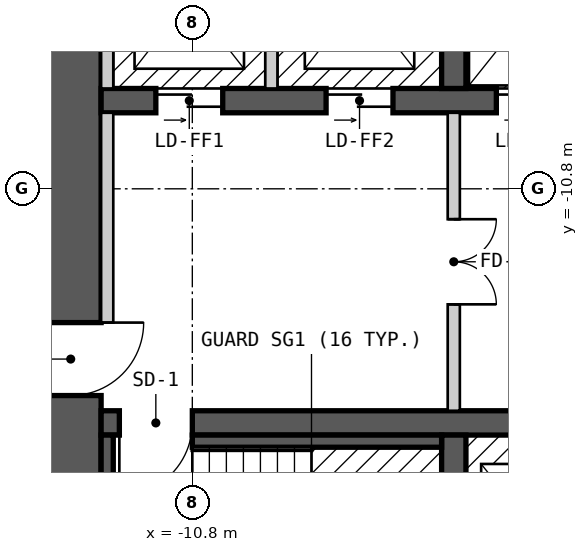
"""IFC4 building model, lengths in metres.
Left out: names, types, materials, properties, quantities, classifications, styles, units other than length and angle.
Written with IfcOpenShell. Run it as: python <this file> out.ifc"""

import sys

from ifc_helpers import new_model, si_unit, direction, frame, frame_2d, origin, place, context, subcontext, project, spatial, rectangle, extrude, element, fill, save


model = new_model("IFC4")
c1 = context("Model", 3, precision=1e-05, world=origin(), true_north=direction((0.0, 1.0)))
c2 = subcontext(c1, "Body", "Model", "MODEL_VIEW")
j1 = project(units=[si_unit("LENGTHUNIT", "METRE"), si_unit("PLANEANGLEUNIT", "RADIAN")], contexts=[c1])
p1 = place(None, origin())
s1 = spatial("IfcSite", under=j1, at=p1, CompositionType="ELEMENT")
p2 = place(p1, origin())
s2 = spatial("IfcBuilding", under=s1, at=p2, CompositionType="ELEMENT")
p3 = place(p2, frame((0.0, 0.0, 81.0)))
s3 = spatial("IfcBuildingStorey", under=s2, at=p3, CompositionType="ELEMENT", Elevation=81.0)
p4 = place(p3, frame((-12.8, -18.0, 0.0), z_axis=(0.0, 0.0, 1.0), x_axis=(0.0, 1.0, 0.0)))
e1 = element("IfcWall", 1, at=p4, inside=s3, PredefinedType="SHEAR", context=c2, shape_type="SweptSolid", body=[
    extrude(rectangle(XDim=12.0, YDim=1.0, at=frame_2d((6.0, 0.0))), origin(), (0.0, 0.0, 1.0), 2.7),
])
p5 = place(p4, frame((3.8, 0.0, 0.0)))
e2 = element("IfcOpeningElement", 2, at=p5, cuts=e1, PredefinedType="OPENING", context=c2, shape_type="SweptSolid", body=[
    extrude(rectangle(XDim=1.2, YDim=2.1, at=frame_2d((0.6, 1.05))), frame((0.0, 0.51, 0.0), z_axis=(0.0, -1.0, 0.0), x_axis=(1.0, 0.0, 0.0)), (0.0, 0.0, 1.0), 1.02),
])
p6 = place(p3, frame((-12.3, -14.65, 0.0), z_axis=(0.0, 0.0, 1.0), x_axis=(1.0, 0.0, 0.0)))
e3 = element("IfcWall", 3, at=p6, inside=s3, PredefinedType="SHEAR", context=c2, shape_type="SweptSolid", body=[
    extrude(rectangle(XDim=24.6, YDim=0.4, at=frame_2d((12.3, 0.0))), origin(), (0.0, 0.0, 1.0), 2.7),
])
p7 = place(p6, frame((1.5, 0.0, 0.0), z_axis=(0.0, 0.0, 1.0), x_axis=(-1.0, 0.0, 0.0)))
e4 = element("IfcOpeningElement", 4, at=p7, cuts=e3, PredefinedType="OPENING", context=c2, shape_type="SweptSolid", body=[
    extrude(rectangle(XDim=1.2, YDim=2.1, at=frame_2d((0.6, 1.05))), frame((0.0, 0.21, 0.0), z_axis=(0.0, -1.0, 0.0), x_axis=(1.0, 0.0, 0.0)), (0.0, 0.0, 1.0), 0.42),
])
p8 = place(p6, frame((24.35, 0.0, 0.0), z_axis=(0.0, 0.0, 1.0), x_axis=(-1.0, 0.0, 0.0)))
e5 = element("IfcOpeningElement", 5, at=p8, cuts=e3, PredefinedType="OPENING", context=c2, shape_type="SweptSolid", body=[
    extrude(rectangle(XDim=1.2, YDim=2.1, at=frame_2d((0.6, 1.05))), frame((0.0, 0.21, 0.0), z_axis=(0.0, -1.0, 0.0), x_axis=(1.0, 0.0, 0.0)), (0.0, 0.0, 1.0), 0.42),
])
p9 = place(p6, frame((16.45, 0.0, 0.0), z_axis=(0.0, 0.0, 1.0), x_axis=(-1.0, 0.0, 0.0)))
e6 = element("IfcOpeningElement", 6, at=p9, cuts=e3, PredefinedType="OPENING", context=c2, shape_type="SweptSolid", body=[
    extrude(rectangle(XDim=0.9, YDim=2.1, at=frame_2d((0.45, 1.05))), frame((0.0, 0.21, 0.0), z_axis=(0.0, -1.0, 0.0), x_axis=(1.0, 0.0, 0.0)), (0.0, 0.0, 1.0), 0.42),
])
p10 = place(p6, frame((18.25, 0.0, 0.0), z_axis=(0.0, 0.0, 1.0), x_axis=(-1.0, 0.0, 0.0)))
e7 = element("IfcOpeningElement", 7, at=p10, cuts=e3, PredefinedType="OPENING", context=c2, shape_type="SweptSolid", body=[
    extrude(rectangle(XDim=0.9, YDim=2.1, at=frame_2d((0.45, 1.05))), frame((0.0, 0.21, 0.0), z_axis=(0.0, -1.0, 0.0), x_axis=(1.0, 0.0, 0.0)), (0.0, 0.0, 1.0), 0.42),
])
p11 = place(p3, frame((-12.3, -9.35, 0.0), z_axis=(0.0, 0.0, 1.0), x_axis=(1.0, 0.0, 0.0)))
e8 = element("IfcWall", 8, at=p11, inside=s3, PredefinedType="SHEAR", context=c2, shape_type="SweptSolid", body=[
    extrude(rectangle(XDim=22.5, YDim=0.4, at=frame_2d((11.25, 0.0))), origin(), (0.0, 0.0, 1.0), 2.7),
])
p12 = place(p11, frame((0.9, 0.0, 0.0)))
e9 = element("IfcOpeningElement", 9, at=p12, cuts=e8, PredefinedType="OPENING", context=c2, shape_type="SweptSolid", body=[
    extrude(rectangle(XDim=1.1, YDim=2.1, at=frame_2d((0.55, 1.05))), frame((0.0, 0.21, 0.0), z_axis=(0.0, -1.0, 0.0), x_axis=(1.0, 0.0, 0.0)), (0.0, 0.0, 1.0), 0.42),
])
p13 = place(p11, frame((3.7, 0.0, 0.0)))
e10 = element("IfcOpeningElement", 10, at=p13, cuts=e8, PredefinedType="OPENING", context=c2, shape_type="SweptSolid", body=[
    extrude(rectangle(XDim=1.1, YDim=2.1, at=frame_2d((0.55, 1.05))), frame((0.0, 0.21, 0.0), z_axis=(0.0, -1.0, 0.0), x_axis=(1.0, 0.0, 0.0)), (0.0, 0.0, 1.0), 0.42),
])
p14 = place(p11, frame((6.5, 0.0, 0.0)))
e11 = element("IfcOpeningElement", 11, at=p14, cuts=e8, PredefinedType="OPENING", context=c2, shape_type="SweptSolid", body=[
    extrude(rectangle(XDim=1.1, YDim=2.1, at=frame_2d((0.55, 1.05))), frame((0.0, 0.21, 0.0), z_axis=(0.0, -1.0, 0.0), x_axis=(1.0, 0.0, 0.0)), (0.0, 0.0, 1.0), 0.42),
])
p15 = place(p11, frame((8.8, 0.0, 0.0)))
e12 = element("IfcOpeningElement", 12, at=p15, cuts=e8, PredefinedType="OPENING", context=c2, shape_type="SweptSolid", body=[
    extrude(rectangle(XDim=1.1, YDim=2.1, at=frame_2d((0.55, 1.05))), frame((0.0, 0.21, 0.0), z_axis=(0.0, -1.0, 0.0), x_axis=(1.0, 0.0, 0.0)), (0.0, 0.0, 1.0), 0.42),
])
p16 = place(p11, frame((11.1, 0.0, 0.0)))
e13 = element("IfcOpeningElement", 13, at=p16, cuts=e8, PredefinedType="OPENING", context=c2, shape_type="SweptSolid", body=[
    extrude(rectangle(XDim=1.1, YDim=2.1, at=frame_2d((0.55, 1.05))), frame((0.0, 0.21, 0.0), z_axis=(0.0, -1.0, 0.0), x_axis=(1.0, 0.0, 0.0)), (0.0, 0.0, 1.0), 0.42),
])
p17 = place(p11, frame((13.4, 0.0, 0.0)))
e14 = element("IfcOpeningElement", 14, at=p17, cuts=e8, PredefinedType="OPENING", context=c2, shape_type="SweptSolid", body=[
    extrude(rectangle(XDim=1.1, YDim=2.1, at=frame_2d((0.55, 1.05))), frame((0.0, 0.21, 0.0), z_axis=(0.0, -1.0, 0.0), x_axis=(1.0, 0.0, 0.0)), (0.0, 0.0, 1.0), 0.42),
])
p18 = place(p11, frame((15.7, 0.0, 0.0)))
e15 = element("IfcOpeningElement", 15, at=p18, cuts=e8, PredefinedType="OPENING", context=c2, shape_type="SweptSolid", body=[
    extrude(rectangle(XDim=1.1, YDim=2.1, at=frame_2d((0.55, 1.05))), frame((0.0, 0.21, 0.0), z_axis=(0.0, -1.0, 0.0), x_axis=(1.0, 0.0, 0.0)), (0.0, 0.0, 1.0), 0.42),
])
p19 = place(p11, frame((18.0, 0.0, 0.0)))
e16 = element("IfcOpeningElement", 16, at=p19, cuts=e8, PredefinedType="OPENING", context=c2, shape_type="SweptSolid", body=[
    extrude(rectangle(XDim=1.1, YDim=2.1, at=frame_2d((0.55, 1.05))), frame((0.0, 0.21, 0.0), z_axis=(0.0, -1.0, 0.0), x_axis=(1.0, 0.0, 0.0)), (0.0, 0.0, 1.0), 0.42),
])
p20 = place(p11, frame((20.4, 0.0, 0.0)))
e17 = element("IfcOpeningElement", 17, at=p20, cuts=e8, PredefinedType="OPENING", context=c2, shape_type="SweptSolid", body=[
    extrude(rectangle(XDim=1.1, YDim=2.1, at=frame_2d((0.55, 1.05))), frame((0.0, 0.21, 0.0), z_axis=(0.0, -1.0, 0.0), x_axis=(1.0, 0.0, 0.0)), (0.0, 0.0, 1.0), 0.42),
])
for number, where, z_axis, x_axis in (
    (18, (-6.5, -18.0, 0.0), (0.0, 0.0, 1.0), (0.0, 1.0, 0.0)),
    (19, (-6.5, -9.15, 0.0), (0.0, 0.0, 1.0), (0.0, 1.0, 0.0)),
):
    element("IfcWall", number, at=place(p3, frame(where, z_axis=z_axis, x_axis=x_axis)), inside=s3, PredefinedType="SHEAR", context=c2, shape_type="SweptSolid", body=[
        extrude(rectangle(XDim=3.15, YDim=0.4, at=frame_2d((1.575, 0.0))), origin(), (0.0, 0.0, 1.0), 2.7),
    ])
p21 = place(p3, frame((-12.2, -18.0, 0.0), z_axis=(0.0, 0.0, 1.0), x_axis=(0.0, 1.0, 0.0)))
e20 = element("IfcWall", 20, at=p21, inside=s3, PredefinedType="SOLIDWALL", context=c2, shape_type="SweptSolid", body=[
    extrude(rectangle(XDim=3.15, YDim=0.2, at=frame_2d((1.575, 0.0))), origin(), (0.0, 0.0, 1.0), 2.7),
])
p22 = place(p3, frame((-12.2, -13.0, 0.0), z_axis=(0.0, 0.0, 1.0), x_axis=(0.0, 1.0, 0.0)))
e21 = element("IfcWall", 21, at=p22, inside=s3, PredefinedType="PARTITIONING", context=c2, shape_type="SweptSolid", body=[
    extrude(rectangle(XDim=3.45, YDim=0.2, at=frame_2d((1.725, 0.0))), origin(), (0.0, 0.0, 1.0), 2.7),
])
p23 = place(p3, frame((-12.2, -9.15, 0.0), z_axis=(0.0, 0.0, 1.0), x_axis=(0.0, 1.0, 0.0)))
e22 = element("IfcWall", 22, at=p23, inside=s3, PredefinedType="SOLIDWALL", context=c2, shape_type="SweptSolid", body=[
    extrude(rectangle(XDim=3.15, YDim=0.2, at=frame_2d((1.575, 0.0))), origin(), (0.0, 0.0, 1.0), 2.7),
])
p24 = place(p3, frame((-10.8, -14.95, 0.0), z_axis=(0.0, 0.0, 1.0), x_axis=(1.0, 0.0, 0.0)))
e23 = element("IfcWall", 23, at=p24, inside=s3, PredefinedType="SOLIDWALL", context=c2, shape_type="SweptSolid", body=[
    extrude(rectangle(XDim=4.1, YDim=0.2, at=frame_2d((2.05, 0.0))), origin(), (0.0, 0.0, 1.0), 2.7),
])
p25 = place(p3, frame((-9.5, -9.15, 0.0), z_axis=(0.0, 0.0, 1.0), x_axis=(0.0, 1.0, 0.0)))
e24 = element("IfcWall", 24, at=p25, inside=s3, PredefinedType="SOLIDWALL", context=c2, shape_type="SweptSolid", body=[
    extrude(rectangle(XDim=2.95, YDim=0.2, at=frame_2d((1.475, 0.0))), origin(), (0.0, 0.0, 1.0), 2.7),
])
p26 = place(p3, frame((-6.5, -14.45, 0.0), z_axis=(0.0, 0.0, 1.0), x_axis=(0.0, 1.0, 0.0)))
e25 = element("IfcWall", 25, at=p26, inside=s3, PredefinedType="PARTITIONING", context=c2, shape_type="SweptSolid", body=[
    extrude(rectangle(XDim=4.9, YDim=0.2, at=frame_2d((2.45, 0.0))), origin(), (0.0, 0.0, 1.0), 2.7),
])
p27 = place(p26, frame((3.15, 0.0, 0.0), z_axis=(0.0, 0.0, 1.0), x_axis=(-1.0, 0.0, 0.0)))
e26 = element("IfcOpeningElement", 26, at=p27, cuts=e25, PredefinedType="OPENING", context=c2, shape_type="SweptSolid", body=[
    extrude(rectangle(XDim=1.4, YDim=2.1, at=frame_2d((0.7, 1.05))), frame((0.0, 0.11, 0.0), z_axis=(0.0, -1.0, 0.0), x_axis=(1.0, 0.0, 0.0)), (0.0, 0.0, 1.0), 0.22),
])
p28 = place(p12, origin())
e27 = element("IfcDoor", 27, at=p28, inside=s3, OperationType="DOUBLE_DOOR_SLIDING", PredefinedType="DOOR", context=c2, shape_type="SweptSolid", body=[
    extrude(rectangle(XDim=1.1, YDim=2.1, at=frame_2d((0.55, 1.05))), frame((0.0, 0.025, 0.0), z_axis=(0.0, -1.0, 0.0), x_axis=(1.0, 0.0, 0.0)), (0.0, 0.0, 1.0), 0.05),
])
fill(e9, e27)
p29 = place(p13, origin())
e28 = element("IfcDoor", 28, at=p29, inside=s3, OperationType="DOUBLE_DOOR_SLIDING", PredefinedType="DOOR", context=c2, shape_type="SweptSolid", body=[
    extrude(rectangle(XDim=1.1, YDim=2.1, at=frame_2d((0.55, 1.05))), frame((0.0, 0.025, 0.0), z_axis=(0.0, -1.0, 0.0), x_axis=(1.0, 0.0, 0.0)), (0.0, 0.0, 1.0), 0.05),
])
fill(e10, e28)
p30 = place(p14, origin())
e29 = element("IfcDoor", 29, at=p30, inside=s3, OperationType="DOUBLE_DOOR_SLIDING", PredefinedType="DOOR", context=c2, shape_type="SweptSolid", body=[
    extrude(rectangle(XDim=1.1, YDim=2.1, at=frame_2d((0.55, 1.05))), frame((0.0, 0.025, 0.0), z_axis=(0.0, -1.0, 0.0), x_axis=(1.0, 0.0, 0.0)), (0.0, 0.0, 1.0), 0.05),
])
fill(e11, e29)
p31 = place(p7, origin())
e30 = element("IfcDoor", 30, at=p31, inside=s3, OperationType="SINGLE_SWING_RIGHT", PredefinedType="DOOR", context=c2, shape_type="SweptSolid", body=[
    extrude(rectangle(XDim=1.2, YDim=2.1, at=frame_2d((0.6, 1.05))), frame((0.0, 0.025, 0.0), z_axis=(0.0, -1.0, 0.0), x_axis=(1.0, 0.0, 0.0)), (0.0, 0.0, 1.0), 0.05),
])
fill(e4, e30)
p32 = place(p5, origin())
e31 = element("IfcDoor", 31, at=p32, inside=s3, OperationType="SINGLE_SWING_RIGHT", PredefinedType="DOOR", context=c2, shape_type="SweptSolid", body=[
    extrude(rectangle(XDim=1.2, YDim=2.1, at=frame_2d((0.6, 1.05))), frame((0.0, 0.025, 0.0), z_axis=(0.0, -1.0, 0.0), x_axis=(1.0, 0.0, 0.0)), (0.0, 0.0, 1.0), 0.05),
])
fill(e2, e31)
p33 = place(p27, origin())
e32 = element("IfcDoor", 32, at=p33, inside=s3, OperationType="DOUBLE_DOOR_SINGLE_SWING", PredefinedType="DOOR", context=c2, shape_type="SweptSolid", body=[
    extrude(rectangle(XDim=1.4, YDim=2.1, at=frame_2d((0.7, 1.05))), frame((0.0, 0.025, 0.0), z_axis=(0.0, -1.0, 0.0), x_axis=(1.0, 0.0, 0.0)), (0.0, 0.0, 1.0), 0.05),
])
fill(e26, e32)
save(model, sys.argv[1])
